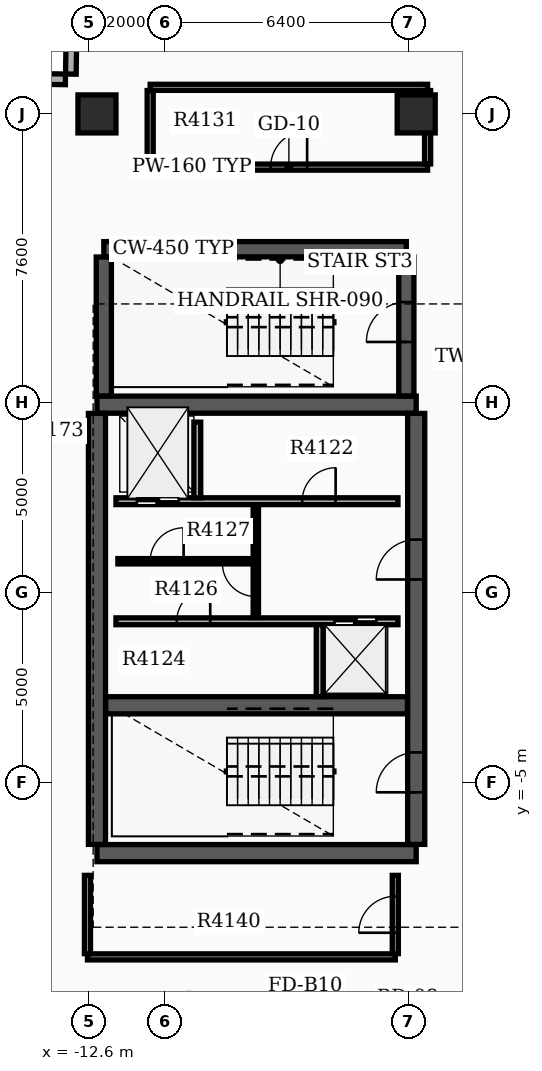
"""IFC4 building model, lengths in metres.
Left out: names, types, materials, properties, quantities, classifications, styles, units other than length and angle.
Written with IfcOpenShell. Run it as: python <this file> out.ifc"""

import sys

from ifc_helpers import new_model, si_unit, direction, frame, frame_2d, origin, origin_2d, place, context, subcontext, project, spatial, rectangle, extrude, element, fill, save


model = new_model("IFC4")
c1 = context("Model", 3, precision=1e-05, world=origin(), true_north=direction((0.0, 1.0)))
c2 = subcontext(c1, "Body", "Model", "MODEL_VIEW")
j1 = project(units=[si_unit("LENGTHUNIT", "METRE"), si_unit("PLANEANGLEUNIT", "RADIAN")], contexts=[c1])
p1 = place(None, origin())
s1 = spatial("IfcSite", under=j1, at=p1, CompositionType="ELEMENT")
p2 = place(p1, origin())
s2 = spatial("IfcBuilding", under=s1, at=p2, CompositionType="ELEMENT")
p3 = place(p2, frame((0.0, 0.0, 261.6)))
s3 = spatial("IfcBuildingStorey", under=s2, at=p3, CompositionType="ELEMENT", Elevation=261.6)
for number, where, z_axis, x_axis in (
    (1, (-12.4, -6.85, 0.0), (0.0, 0.0, 1.0), (1.0, 0.0, 0.0)),
    (2, (-12.4, 4.95, 0.0), (0.0, 0.0, 1.0), (1.0, 0.0, 0.0)),
):
    element("IfcWall", number, at=place(p3, frame(where, z_axis=z_axis, x_axis=x_axis)), inside=s3, PredefinedType="SHEAR", context=c2, shape_type="SweptSolid", body=[
        extrude(rectangle(XDim=8.4, YDim=0.45, at=frame_2d((4.2, 0.0))), origin(), (0.0, 0.0, 1.0), 3.7),
    ])
p4 = place(p3, frame((-12.4, -6.62, 0.0), z_axis=(0.0, 0.0, 1.0), x_axis=(0.0, 1.0, 0.0)))
e3 = element("IfcWall", 3, at=p4, inside=s3, PredefinedType="SHEAR", context=c2, shape_type="SweptSolid", body=[
    extrude(rectangle(XDim=11.34, YDim=0.45, at=frame_2d((5.67, 0.0))), origin(), (0.0, 0.0, 1.0), 3.7),
])
p5 = place(p3, frame((-4.0, -6.62, 0.0), z_axis=(0.0, 0.0, 1.0), x_axis=(0.0, 1.0, 0.0)))
e4 = element("IfcWall", 4, at=p5, inside=s3, PredefinedType="SHEAR", context=c2, shape_type="SweptSolid", body=[
    extrude(rectangle(XDim=11.34, YDim=0.45, at=frame_2d((5.67, 0.0))), origin(), (0.0, 0.0, 1.0), 3.7),
])
p6 = place(p5, frame((1.37, 0.0, 0.0)))
e5 = element("IfcOpeningElement", 5, at=p6, cuts=e4, PredefinedType="OPENING", context=c2, shape_type="SweptSolid", body=[
    extrude(rectangle(XDim=1.05, YDim=2.15, at=frame_2d((0.525, 1.075))), frame((0.0, 0.235, 0.0), z_axis=(0.0, -1.0, 0.0), x_axis=(1.0, 0.0, 0.0)), (0.0, 0.0, 1.0), 0.47),
])
p7 = place(p5, frame((6.97, 0.0, 0.0)))
e6 = element("IfcOpeningElement", 6, at=p7, cuts=e4, PredefinedType="OPENING", context=c2, shape_type="SweptSolid", body=[
    extrude(rectangle(XDim=1.05, YDim=2.15, at=frame_2d((0.525, 1.075))), frame((0.0, 0.235, 0.0), z_axis=(0.0, -1.0, 0.0), x_axis=(1.0, 0.0, 0.0)), (0.0, 0.0, 1.0), 0.47),
])
p8 = place(p3, frame((-12.17, -2.96, 0.0), z_axis=(0.0, 0.0, 1.0), x_axis=(1.0, 0.0, 0.0)))
e7 = element("IfcWall", 7, at=p8, inside=s3, PredefinedType="SHEAR", context=c2, shape_type="SweptSolid", body=[
    extrude(rectangle(XDim=7.94, YDim=0.45, at=frame_2d((3.97, 0.0))), origin(), (0.0, 0.0, 1.0), 3.7),
])
p9 = place(p3, frame((-12.22, 9.04, 0.0), z_axis=(0.0, 0.0, 1.0), x_axis=(1.0, 0.0, 0.0)))
e8 = element("IfcWall", 8, at=p9, inside=s3, PredefinedType="SHEAR", context=c2, shape_type="SweptSolid", body=[
    extrude(rectangle(XDim=7.96, YDim=0.4, at=frame_2d((3.98, 0.0))), origin(), (0.0, 0.0, 1.0), 3.7),
])
p10 = place(p3, frame((-12.22, 5.18, 0.0), z_axis=(0.0, 0.0, 1.0), x_axis=(0.0, 1.0, 0.0)))
e9 = element("IfcWall", 9, at=p10, inside=s3, PredefinedType="SHEAR", context=c2, shape_type="SweptSolid", body=[
    extrude(rectangle(XDim=3.655, YDim=0.4, at=frame_2d((1.828, 0.0))), origin(), (0.0, 0.0, 1.0), 3.7),
])
p11 = place(p3, frame((-4.26, 5.18, 0.0), z_axis=(0.0, 0.0, 1.0), x_axis=(0.0, 1.0, 0.0)))
e10 = element("IfcWall", 10, at=p11, inside=s3, PredefinedType="SHEAR", context=c2, shape_type="SweptSolid", body=[
    extrude(rectangle(XDim=3.655, YDim=0.4, at=frame_2d((1.828, 0.0))), origin(), (0.0, 0.0, 1.0), 3.7),
])
p12 = place(p11, frame((1.42, 0.0, 0.0)))
e11 = element("IfcOpeningElement", 11, at=p12, cuts=e10, PredefinedType="OPENING", context=c2, shape_type="SweptSolid", body=[
    extrude(rectangle(XDim=1.05, YDim=2.15, at=frame_2d((0.525, 1.075))), frame((0.0, 0.21, 0.0), z_axis=(0.0, -1.0, 0.0), x_axis=(1.0, 0.0, 0.0)), (0.0, 0.0, 1.0), 0.42),
])
for number, where, z_axis, x_axis in (
    (12, (-12.4, 12.6, 0.0), (0.0, 0.0, 1.0), (1.0, 0.0, 0.0)),
    (13, (-4.0, 12.6, 0.0), (0.0, 0.0, 1.0), (1.0, 0.0, 0.0)),
):
    element("IfcColumn", number, at=place(p3, frame(where, z_axis=z_axis, x_axis=x_axis)), inside=s3, PredefinedType="COLUMN", context=c2, shape_type="SweptSolid", body=[
        extrude(rectangle(XDim=1.0, YDim=1.0, at=origin_2d()), origin(), (0.0, 0.0, 1.0), 3.9),
    ])
p13 = place(p3, frame((-14.449, 13.529, 0.0), z_axis=(0.0, 0.0, 1.0), x_axis=(0.999878147354, -0.015610587569, 0.0)))
e14 = element("IfcWall", 14, at=p13, inside=s3, PredefinedType="STANDARD", context=c2, shape_type="SweptSolid", body=[
    extrude(rectangle(XDim=1.22, YDim=0.28, at=frame_2d((0.61, 0.0))), origin(), (0.0, 0.0, 1.0), 3.18),
])
p14 = place(p3, frame((-13.087, 13.647, 0.0), z_axis=(0.0, 0.0, 1.0), x_axis=(0.015785793208, 0.999875396603, 0.0)))
e15 = element("IfcWall", 15, at=p14, inside=s3, PredefinedType="STANDARD", context=c2, shape_type="SweptSolid", body=[
    extrude(rectangle(XDim=1.5, YDim=0.28, at=frame_2d((0.75, 0.0))), origin(), (0.0, 0.0, 1.0), 3.18),
])
p15 = place(p3, frame((-11.9, 2.41, 0.0), z_axis=(0.0, 0.0, 1.0), x_axis=(1.0, 0.0, 0.0)))
e16 = element("IfcWall", 16, at=p15, inside=s3, PredefinedType="SOLIDWALL", context=c2, shape_type="SweptSolid", body=[
    extrude(rectangle(XDim=7.42, YDim=0.18, at=frame_2d((3.71, 0.0))), origin(), (0.0, 0.0, 1.0), 3.17),
])
p16 = place(p15, frame((0.55, 0.0, 0.0)))
e17 = element("IfcOpeningElement", 17, at=p16, cuts=e16, PredefinedType="OPENING", context=c2, shape_type="SweptSolid", body=[
    extrude(rectangle(XDim=1.1, YDim=2.15, at=frame_2d((0.55, 1.075))), frame((0.0, 0.1, 0.0), z_axis=(0.0, -1.0, 0.0), x_axis=(1.0, 0.0, 0.0)), (0.0, 0.0, 1.0), 0.2),
])
p17 = place(p15, frame((4.9, 0.0, 0.0)))
e18 = element("IfcOpeningElement", 18, at=p17, cuts=e16, PredefinedType="OPENING", context=c2, shape_type="SweptSolid", body=[
    extrude(rectangle(XDim=0.88, YDim=2.1, at=frame_2d((0.44, 1.05))), frame((0.0, 0.1, 0.0), z_axis=(0.0, -1.0, 0.0), x_axis=(1.0, 0.0, 0.0)), (0.0, 0.0, 1.0), 0.2),
])
p18 = place(p3, frame((-11.9, -0.75, 0.0), z_axis=(0.0, 0.0, 1.0), x_axis=(1.0, 0.0, 0.0)))
e19 = element("IfcWall", 19, at=p18, inside=s3, PredefinedType="SOLIDWALL", context=c2, shape_type="SweptSolid", body=[
    extrude(rectangle(XDim=7.42, YDim=0.18, at=frame_2d((3.71, 0.0))), origin(), (0.0, 0.0, 1.0), 3.17),
])
p19 = place(p18, frame((5.75, 0.0, 0.0)))
e20 = element("IfcOpeningElement", 20, at=p19, cuts=e19, PredefinedType="OPENING", context=c2, shape_type="SweptSolid", body=[
    extrude(rectangle(XDim=1.1, YDim=2.15, at=frame_2d((0.55, 1.075))), frame((0.0, 0.1, 0.0), z_axis=(0.0, -1.0, 0.0), x_axis=(1.0, 0.0, 0.0)), (0.0, 0.0, 1.0), 0.2),
])
p20 = place(p18, frame((1.6, 0.0, 0.0)))
e21 = element("IfcOpeningElement", 21, at=p20, cuts=e19, PredefinedType="OPENING", context=c2, shape_type="SweptSolid", body=[
    extrude(rectangle(XDim=0.88, YDim=2.1, at=frame_2d((0.44, 1.05))), frame((0.0, 0.1, 0.0), z_axis=(0.0, -1.0, 0.0), x_axis=(1.0, 0.0, 0.0)), (0.0, 0.0, 1.0), 0.2),
])
p21 = place(p3, frame((-9.76, 2.5, 0.0), z_axis=(0.0, 0.0, 1.0), x_axis=(0.0, 1.0, 0.0)))
e22 = element("IfcWall", 22, at=p21, inside=s3, PredefinedType="SOLIDWALL", context=c2, shape_type="SweptSolid", body=[
    extrude(rectangle(XDim=1.99, YDim=0.18, at=frame_2d((0.995, 0.0))), origin(), (0.0, 0.0, 1.0), 3.17),
])
p22 = place(p3, frame((-6.54, -2.73, 0.0), z_axis=(0.0, 0.0, 1.0), x_axis=(0.0, 1.0, 0.0)))
e23 = element("IfcWall", 23, at=p22, inside=s3, PredefinedType="SOLIDWALL", context=c2, shape_type="SweptSolid", body=[
    extrude(rectangle(XDim=1.89, YDim=0.18, at=frame_2d((0.945, 0.0))), origin(), (0.0, 0.0, 1.0), 3.17),
])
p23 = place(p3, frame((-8.22, -0.65, 0.0), z_axis=(0.0, 0.0, 1.0), x_axis=(0.0, 1.0, 0.0)))
e24 = element("IfcWall", 24, at=p23, inside=s3, PredefinedType="SOLIDWALL", context=c2, shape_type="SweptSolid", body=[
    extrude(rectangle(XDim=2.96, YDim=0.14, at=frame_2d((1.48, 0.0))), origin(), (0.0, 0.0, 1.0), 3.17),
])
p24 = place(p23, frame((0.55, 0.0, 0.0)))
e25 = element("IfcOpeningElement", 25, at=p24, cuts=e24, PredefinedType="OPENING", context=c2, shape_type="SweptSolid", body=[
    extrude(rectangle(XDim=0.88, YDim=2.1, at=frame_2d((0.44, 1.05))), frame((0.0, 0.08, 0.0), z_axis=(0.0, -1.0, 0.0), x_axis=(1.0, 0.0, 0.0)), (0.0, 0.0, 1.0), 0.16),
])
p25 = place(p3, frame((-11.85, 0.83, 0.0), z_axis=(0.0, 0.0, 1.0), x_axis=(1.0, 0.0, 0.0)))
e26 = element("IfcWall", 26, at=p25, inside=s3, PredefinedType="PARTITIONING", context=c2, shape_type="SweptSolid", body=[
    extrude(rectangle(XDim=3.552, YDim=0.14, at=frame_2d((1.776, 0.0))), origin(), (0.0, 0.0, 1.0), 3.17),
])
p26 = place(p25, frame((0.85, 0.0, 0.0)))
e27 = element("IfcOpeningElement", 27, at=p26, cuts=e26, PredefinedType="OPENING", context=c2, shape_type="SweptSolid", body=[
    extrude(rectangle(XDim=0.88, YDim=2.1, at=frame_2d((0.44, 1.05))), frame((0.0, 0.08, 0.0), z_axis=(0.0, -1.0, 0.0), x_axis=(1.0, 0.0, 0.0)), (0.0, 0.0, 1.0), 0.16),
])
p27 = place(p3, frame((-11.0, 11.2, 0.0), z_axis=(0.0, 0.0, 1.0), x_axis=(1.0, 0.0, 0.0)))
e28 = element("IfcWall", 28, at=p27, inside=s3, PredefinedType="PARTITIONING", context=c2, shape_type="SweptSolid", body=[
    extrude(rectangle(XDim=7.3, YDim=0.16, at=frame_2d((3.65, 0.0))), origin(), (0.0, 0.0, 1.0), 3.17),
])
p28 = place(p27, frame((3.17, 0.0, 0.0)))
e29 = element("IfcOpeningElement", 29, at=p28, cuts=e28, PredefinedType="OPENING", context=c2, shape_type="SweptSolid", body=[
    extrude(rectangle(XDim=0.96, YDim=2.15, at=frame_2d((0.48, 1.075))), frame((0.0, 0.09, 0.0), z_axis=(0.0, -1.0, 0.0), x_axis=(1.0, 0.0, 0.0)), (0.0, 0.0, 1.0), 0.18),
])
p29 = place(p3, frame((-11.0, 13.3, 0.0), z_axis=(0.0, 0.0, 1.0), x_axis=(1.0, 0.0, 0.0)))
e30 = element("IfcWall", 30, at=p29, inside=s3, PredefinedType="PARTITIONING", context=c2, shape_type="SweptSolid", body=[
    extrude(rectangle(XDim=7.3, YDim=0.16, at=frame_2d((3.65, 0.0))), origin(), (0.0, 0.0, 1.0), 3.17),
])
for number, where, z_axis, x_axis in (
    (31, (-11.0, 11.285, 0.0), (0.0, 0.0, 1.0), (0.0, 1.0, 0.0)),
    (32, (-3.7, 11.285, 0.0), (0.0, 0.0, 1.0), (0.0, 1.0, 0.0)),
):
    element("IfcWall", number, at=place(p3, frame(where, z_axis=z_axis, x_axis=x_axis)), inside=s3, PredefinedType="PARTITIONING", context=c2, shape_type="SweptSolid", body=[
        extrude(rectangle(XDim=1.93, YDim=0.16, at=frame_2d((0.965, 0.0))), origin(), (0.0, 0.0, 1.0), 3.17),
    ])
p30 = place(p3, frame((-12.65, -9.58, 0.0), z_axis=(0.0, 0.0, 1.0), x_axis=(1.0, 0.0, 0.0)))
e33 = element("IfcWall", 33, at=p30, inside=s3, PredefinedType="PARTITIONING", context=c2, shape_type="SweptSolid", body=[
    extrude(rectangle(XDim=8.1, YDim=0.16, at=frame_2d((4.05, 0.0))), origin(), (0.0, 0.0, 1.0), 3.17),
])
p31 = place(p3, frame((-12.65, -9.495, 0.0), z_axis=(0.0, 0.0, 1.0), x_axis=(0.0, 1.0, 0.0)))
e34 = element("IfcWall", 34, at=p31, inside=s3, PredefinedType="PARTITIONING", context=c2, shape_type="SweptSolid", body=[
    extrude(rectangle(XDim=2.06, YDim=0.16, at=frame_2d((1.03, 0.0))), origin(), (0.0, 0.0, 1.0), 3.17),
])
p32 = place(p3, frame((-4.55, -9.495, 0.0), z_axis=(0.0, 0.0, 1.0), x_axis=(0.0, 1.0, 0.0)))
e35 = element("IfcWall", 35, at=p32, inside=s3, PredefinedType="PARTITIONING", context=c2, shape_type="SweptSolid", body=[
    extrude(rectangle(XDim=2.06, YDim=0.16, at=frame_2d((1.03, 0.0))), origin(), (0.0, 0.0, 1.0), 3.17),
])
p33 = place(p32, frame((0.55, 0.0, 0.0)))
e36 = element("IfcOpeningElement", 36, at=p33, cuts=e35, PredefinedType="OPENING", context=c2, shape_type="SweptSolid", body=[
    extrude(rectangle(XDim=0.96, YDim=2.15, at=frame_2d((0.48, 1.075))), frame((0.0, 0.09, 0.0), z_axis=(0.0, -1.0, 0.0), x_axis=(1.0, 0.0, 0.0)), (0.0, 0.0, 1.0), 0.18),
])
p34 = place(p6, origin())
e37 = element("IfcDoor", 37, at=p34, inside=s3, OperationType="SINGLE_SWING_LEFT", PredefinedType="DOOR", context=c2, shape_type="SweptSolid", body=[
    extrude(rectangle(XDim=1.05, YDim=2.15, at=frame_2d((0.525, 1.075))), frame((0.0, 0.025, 0.0), z_axis=(0.0, -1.0, 0.0), x_axis=(1.0, 0.0, 0.0)), (0.0, 0.0, 1.0), 0.05),
])
fill(e5, e37)
p35 = place(p7, origin())
e38 = element("IfcDoor", 38, at=p35, inside=s3, OperationType="SINGLE_SWING_LEFT", PredefinedType="DOOR", context=c2, shape_type="SweptSolid", body=[
    extrude(rectangle(XDim=1.05, YDim=2.15, at=frame_2d((0.525, 1.075))), frame((0.0, 0.025, 0.0), z_axis=(0.0, -1.0, 0.0), x_axis=(1.0, 0.0, 0.0)), (0.0, 0.0, 1.0), 0.05),
])
fill(e6, e38)
p36 = place(p12, origin())
e39 = element("IfcDoor", 39, at=p36, inside=s3, OperationType="SINGLE_SWING_LEFT", PredefinedType="DOOR", context=c2, shape_type="SweptSolid", body=[
    extrude(rectangle(XDim=1.05, YDim=2.15, at=frame_2d((0.525, 1.075))), frame((0.0, 0.025, 0.0), z_axis=(0.0, -1.0, 0.0), x_axis=(1.0, 0.0, 0.0)), (0.0, 0.0, 1.0), 0.05),
])
fill(e11, e39)
p37 = place(p16, origin())
e40 = element("IfcDoor", 40, at=p37, inside=s3, OperationType="DOUBLE_DOOR_SLIDING", PredefinedType="DOOR", context=c2, shape_type="SweptSolid", body=[
    extrude(rectangle(XDim=1.1, YDim=2.15, at=frame_2d((0.55, 1.075))), frame((0.0, 0.025, 0.0), z_axis=(0.0, -1.0, 0.0), x_axis=(1.0, 0.0, 0.0)), (0.0, 0.0, 1.0), 0.05),
])
fill(e17, e40)
p38 = place(p19, origin())
e41 = element("IfcDoor", 41, at=p38, inside=s3, OperationType="DOUBLE_DOOR_SLIDING", PredefinedType="DOOR", context=c2, shape_type="SweptSolid", body=[
    extrude(rectangle(XDim=1.1, YDim=2.15, at=frame_2d((0.55, 1.075))), frame((0.0, 0.025, 0.0), z_axis=(0.0, -1.0, 0.0), x_axis=(1.0, 0.0, 0.0)), (0.0, 0.0, 1.0), 0.05),
])
fill(e20, e41)
p39 = place(p17, origin())
e42 = element("IfcDoor", 42, at=p39, inside=s3, OperationType="SINGLE_SWING_RIGHT", PredefinedType="DOOR", context=c2, shape_type="SweptSolid", body=[
    extrude(rectangle(XDim=0.88, YDim=2.1, at=frame_2d((0.44, 1.05))), frame((0.0, 0.025, 0.0), z_axis=(0.0, -1.0, 0.0), x_axis=(1.0, 0.0, 0.0)), (0.0, 0.0, 1.0), 0.05),
])
fill(e18, e42)
p40 = place(p20, origin())
e43 = element("IfcDoor", 43, at=p40, inside=s3, OperationType="SINGLE_SWING_RIGHT", PredefinedType="DOOR", context=c2, shape_type="SweptSolid", body=[
    extrude(rectangle(XDim=0.88, YDim=2.1, at=frame_2d((0.44, 1.05))), frame((0.0, 0.025, 0.0), z_axis=(0.0, -1.0, 0.0), x_axis=(1.0, 0.0, 0.0)), (0.0, 0.0, 1.0), 0.05),
])
fill(e21, e43)
p41 = place(p24, origin())
e44 = element("IfcDoor", 44, at=p41, inside=s3, OperationType="SINGLE_SWING_RIGHT", PredefinedType="DOOR", context=c2, shape_type="SweptSolid", body=[
    extrude(rectangle(XDim=0.88, YDim=2.1, at=frame_2d((0.44, 1.05))), frame((0.0, 0.025, 0.0), z_axis=(0.0, -1.0, 0.0), x_axis=(1.0, 0.0, 0.0)), (0.0, 0.0, 1.0), 0.05),
])
fill(e25, e44)
p42 = place(p26, origin())
e45 = element("IfcDoor", 45, at=p42, inside=s3, OperationType="SINGLE_SWING_RIGHT", PredefinedType="DOOR", context=c2, shape_type="SweptSolid", body=[
    extrude(rectangle(XDim=0.88, YDim=2.1, at=frame_2d((0.44, 1.05))), frame((0.0, 0.025, 0.0), z_axis=(0.0, -1.0, 0.0), x_axis=(1.0, 0.0, 0.0)), (0.0, 0.0, 1.0), 0.05),
])
fill(e27, e45)
p43 = place(p28, origin())
e46 = element("IfcDoor", 46, at=p43, inside=s3, OperationType="SINGLE_SWING_RIGHT", PredefinedType="DOOR", context=c2, shape_type="SweptSolid", body=[
    extrude(rectangle(XDim=0.96, YDim=2.15, at=frame_2d((0.48, 1.075))), frame((0.0, 0.025, 0.0), z_axis=(0.0, -1.0, 0.0), x_axis=(1.0, 0.0, 0.0)), (0.0, 0.0, 1.0), 0.05),
])
fill(e29, e46)
p44 = place(p33, origin())
e47 = element("IfcDoor", 47, at=p44, inside=s3, OperationType="SINGLE_SWING_LEFT", PredefinedType="DOOR", context=c2, shape_type="SweptSolid", body=[
    extrude(rectangle(XDim=0.96, YDim=2.15, at=frame_2d((0.48, 1.075))), frame((0.0, 0.025, 0.0), z_axis=(0.0, -1.0, 0.0), x_axis=(1.0, 0.0, 0.0)), (0.0, 0.0, 1.0), 0.05),
])
fill(e36, e47)
save(model, sys.argv[1])
